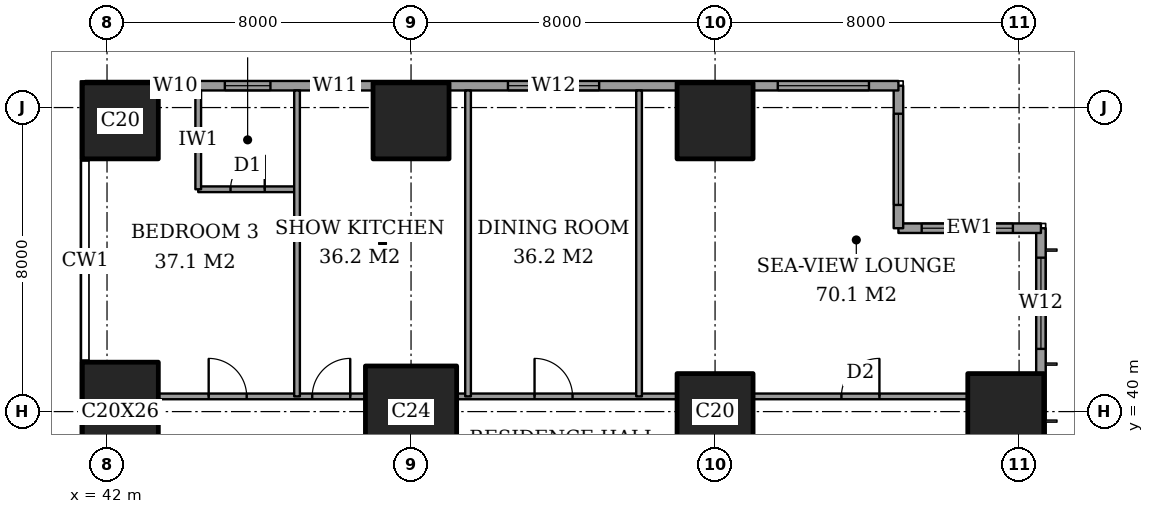
"""IFC4 building model, lengths in metres.
Left out: names, types, materials, properties, quantities, classifications, styles, units other than length and angle.
Written with IfcOpenShell. Run it as: python <this file> out.ifc"""

import sys

from ifc_helpers import new_model, si_unit, direction, frame, frame_2d, origin, origin_2d, place, context, subcontext, project, spatial, rectangle, extrude, element, fill, save


model = new_model("IFC4")
c1 = context("Model", 3, precision=1e-05, world=origin(), true_north=direction((0.0, 1.0)))
c2 = subcontext(c1, "Body", "Model", "MODEL_VIEW")
j1 = project(units=[si_unit("LENGTHUNIT", "METRE"), si_unit("PLANEANGLEUNIT", "RADIAN")], contexts=[c1])
p1 = place(None, origin())
s1 = spatial("IfcSite", under=j1, at=p1, CompositionType="ELEMENT")
p2 = place(p1, origin())
s2 = spatial("IfcBuilding", under=s1, at=p2, CompositionType="ELEMENT")
p3 = place(p2, frame((0.0, 0.0, 125.0)))
s3 = spatial("IfcBuildingStorey", under=s2, at=p3, CompositionType="ELEMENT", Elevation=125.0)
p4 = place(p3, frame((42.35, 40.0, 0.0), z_axis=(0.0, 0.0, 1.0), x_axis=(1.0, 0.0, 0.0)))
e1 = element("IfcColumn", 1, at=p4, inside=s3, PredefinedType="COLUMN", context=c2, shape_type="SweptSolid", body=[
    extrude(rectangle(XDim=2.0, YDim=2.6, at=origin_2d()), origin(), (0.0, 0.0, 1.0), 3.6),
])
p5 = place(p3, frame((42.35, 47.65, 0.0), z_axis=(0.0, 0.0, 1.0), x_axis=(1.0, 0.0, 0.0)))
e2 = element("IfcColumn", 2, at=p5, inside=s3, PredefinedType="COLUMN", context=c2, shape_type="SweptSolid", body=[
    extrude(rectangle(XDim=2.0, YDim=2.0, at=origin_2d()), origin(), (0.0, 0.0, 1.0), 3.6),
])
p6 = place(p3, frame((50.0, 40.0, 0.0), z_axis=(0.0, 0.0, 1.0), x_axis=(1.0, 0.0, 0.0)))
e3 = element("IfcColumn", 3, at=p6, inside=s3, PredefinedType="COLUMN", context=c2, shape_type="SweptSolid", body=[
    extrude(rectangle(XDim=2.4, YDim=2.4, at=origin_2d()), origin(), (0.0, 0.0, 1.0), 3.6),
])
for number, where, z_axis, x_axis in (
    (4, (50.0, 47.65, 0.0), (0.0, 0.0, 1.0), (1.0, 0.0, 0.0)),
    (5, (58.0, 40.0, 0.0), (0.0, 0.0, 1.0), (1.0, 0.0, 0.0)),
    (6, (58.0, 47.65, 0.0), (0.0, 0.0, 1.0), (1.0, 0.0, 0.0)),
    (7, (65.65, 40.0, 0.0), (0.0, 0.0, 1.0), (1.0, 0.0, 0.0)),
):
    element("IfcColumn", number, at=place(p3, frame(where, z_axis=z_axis, x_axis=x_axis)), inside=s3, PredefinedType="COLUMN", context=c2, shape_type="SweptSolid", body=[
        extrude(rectangle(XDim=2.0, YDim=2.0, at=origin_2d()), origin(), (0.0, 0.0, 1.0), 3.6),
    ])
p7 = place(p3, frame((66.575, 3.175, 0.0), z_axis=(0.0, 0.0, 1.0), x_axis=(0.0, 1.0, 0.0)))
e8 = element("IfcWall", 8, at=p7, inside=s3, PredefinedType="SOLIDWALL", context=c2, shape_type="SweptSolid", body=[
    extrude(rectangle(XDim=41.65, YDim=0.25, at=frame_2d((20.825, 0.0))), origin(), (0.0, 0.0, 1.0), 3.6),
])
p8 = place(p7, frame((0.775, 0.0, 0.4)))
e9 = element("IfcOpeningElement", 9, at=p8, cuts=e8, PredefinedType="OPENING", context=c2, shape_type="SweptSolid", body=[
    extrude(rectangle(XDim=2.4, YDim=2.2, at=frame_2d((1.2, 1.1))), frame((0.0, 0.135, 0.0), z_axis=(0.0, -1.0, 0.0), x_axis=(1.0, 0.0, 0.0)), (0.0, 0.0, 1.0), 0.27),
])
p9 = place(p7, frame((6.125, 0.0, 0.4)))
e10 = element("IfcOpeningElement", 10, at=p9, cuts=e8, PredefinedType="OPENING", context=c2, shape_type="SweptSolid", body=[
    extrude(rectangle(XDim=1.2, YDim=2.2, at=frame_2d((0.6, 1.1))), frame((0.0, 0.135, 0.0), z_axis=(0.0, -1.0, 0.0), x_axis=(1.0, 0.0, 0.0)), (0.0, 0.0, 1.0), 0.27),
])
p10 = place(p7, frame((8.375, 0.0, 0.4)))
e11 = element("IfcOpeningElement", 11, at=p10, cuts=e8, PredefinedType="OPENING", context=c2, shape_type="SweptSolid", body=[
    extrude(rectangle(XDim=2.4, YDim=2.2, at=frame_2d((1.2, 1.1))), frame((0.0, 0.135, 0.0), z_axis=(0.0, -1.0, 0.0), x_axis=(1.0, 0.0, 0.0)), (0.0, 0.0, 1.0), 0.27),
])
p11 = place(p7, frame((15.775, 0.0, 0.4)))
e12 = element("IfcOpeningElement", 12, at=p11, cuts=e8, PredefinedType="OPENING", context=c2, shape_type="SweptSolid", body=[
    extrude(rectangle(XDim=2.4, YDim=2.2, at=frame_2d((1.2, 1.1))), frame((0.0, 0.135, 0.0), z_axis=(0.0, -1.0, 0.0), x_axis=(1.0, 0.0, 0.0)), (0.0, 0.0, 1.0), 0.27),
])
p12 = place(p7, frame((23.475, 0.0, 0.4)))
e13 = element("IfcOpeningElement", 13, at=p12, cuts=e8, PredefinedType="OPENING", context=c2, shape_type="SweptSolid", body=[
    extrude(rectangle(XDim=2.4, YDim=2.2, at=frame_2d((1.2, 1.1))), frame((0.0, 0.135, 0.0), z_axis=(0.0, -1.0, 0.0), x_axis=(1.0, 0.0, 0.0)), (0.0, 0.0, 1.0), 0.27),
])
p13 = place(p7, frame((30.975, 0.0, 0.4)))
e14 = element("IfcOpeningElement", 14, at=p13, cuts=e8, PredefinedType="OPENING", context=c2, shape_type="SweptSolid", body=[
    extrude(rectangle(XDim=2.4, YDim=2.2, at=frame_2d((1.2, 1.1))), frame((0.0, 0.135, 0.0), z_axis=(0.0, -1.0, 0.0), x_axis=(1.0, 0.0, 0.0)), (0.0, 0.0, 1.0), 0.27),
])
p14 = place(p7, frame((34.5, 0.0, 0.4)))
e15 = element("IfcOpeningElement", 15, at=p14, cuts=e8, PredefinedType="OPENING", context=c2, shape_type="SweptSolid", body=[
    extrude(rectangle(XDim=1.2, YDim=2.2, at=frame_2d((0.6, 1.1))), frame((0.0, 0.135, 0.0), z_axis=(0.0, -1.0, 0.0), x_axis=(1.0, 0.0, 0.0)), (0.0, 0.0, 1.0), 0.27),
])
p15 = place(p7, frame((38.475, 0.0, 0.4)))
e16 = element("IfcOpeningElement", 16, at=p15, cuts=e8, PredefinedType="OPENING", context=c2, shape_type="SweptSolid", body=[
    extrude(rectangle(XDim=2.4, YDim=2.2, at=frame_2d((1.2, 1.1))), frame((0.0, 0.135, 0.0), z_axis=(0.0, -1.0, 0.0), x_axis=(1.0, 0.0, 0.0)), (0.0, 0.0, 1.0), 0.27),
])
p16 = place(p3, frame((66.575, 44.825, 0.0), z_axis=(0.0, 0.0, 1.0), x_axis=(-1.0, 0.0, 0.0)))
e17 = element("IfcWall", 17, at=p16, inside=s3, PredefinedType="SOLIDWALL", context=c2, shape_type="SweptSolid", body=[
    extrude(rectangle(XDim=3.75, YDim=0.25, at=frame_2d((1.875, 0.0))), origin(), (0.0, 0.0, 1.0), 3.6),
])
p17 = place(p16, frame((0.738, 0.0, 0.4)))
e18 = element("IfcOpeningElement", 18, at=p17, cuts=e17, PredefinedType="OPENING", context=c2, shape_type="SweptSolid", body=[
    extrude(rectangle(XDim=2.4, YDim=2.2, at=frame_2d((1.2, 1.1))), frame((0.0, 0.135, 0.0), z_axis=(0.0, -1.0, 0.0), x_axis=(1.0, 0.0, 0.0)), (0.0, 0.0, 1.0), 0.27),
])
p18 = place(p3, frame((62.825, 44.825, 0.0), z_axis=(0.0, 0.0, 1.0), x_axis=(0.0, 1.0, 0.0)))
e19 = element("IfcWall", 19, at=p18, inside=s3, PredefinedType="SOLIDWALL", context=c2, shape_type="SweptSolid", body=[
    extrude(rectangle(XDim=3.75, YDim=0.25, at=frame_2d((1.875, 0.0))), origin(), (0.0, 0.0, 1.0), 3.6),
])
p19 = place(p18, frame((0.613, 0.0, 0.4)))
e20 = element("IfcOpeningElement", 20, at=p19, cuts=e19, PredefinedType="OPENING", context=c2, shape_type="SweptSolid", body=[
    extrude(rectangle(XDim=2.4, YDim=2.2, at=frame_2d((1.2, 1.1))), frame((0.0, 0.135, 0.0), z_axis=(0.0, -1.0, 0.0), x_axis=(1.0, 0.0, 0.0)), (0.0, 0.0, 1.0), 0.27),
])
p20 = place(p3, frame((62.825, 48.575, 0.0), z_axis=(0.0, 0.0, 1.0), x_axis=(-1.0, 0.0, 0.0)))
e21 = element("IfcWall", 21, at=p20, inside=s3, PredefinedType="SOLIDWALL", context=c2, shape_type="SweptSolid", body=[
    extrude(rectangle(XDim=21.4, YDim=0.25, at=frame_2d((10.7, 0.0))), origin(), (0.0, 0.0, 1.0), 3.6),
])
p21 = place(p20, frame((0.775, 0.0, 0.4)))
e22 = element("IfcOpeningElement", 22, at=p21, cuts=e21, PredefinedType="OPENING", context=c2, shape_type="SweptSolid", body=[
    extrude(rectangle(XDim=2.4, YDim=2.2, at=frame_2d((1.2, 1.1))), frame((0.0, 0.135, 0.0), z_axis=(0.0, -1.0, 0.0), x_axis=(1.0, 0.0, 0.0)), (0.0, 0.0, 1.0), 0.27),
])
p22 = place(p20, frame((7.875, 0.0, 0.4)))
e23 = element("IfcOpeningElement", 23, at=p22, cuts=e21, PredefinedType="OPENING", context=c2, shape_type="SweptSolid", body=[
    extrude(rectangle(XDim=2.4, YDim=2.2, at=frame_2d((1.2, 1.1))), frame((0.0, 0.135, 0.0), z_axis=(0.0, -1.0, 0.0), x_axis=(1.0, 0.0, 0.0)), (0.0, 0.0, 1.0), 0.27),
])
p23 = place(p20, frame((14.225, 0.0, 0.4)))
e24 = element("IfcOpeningElement", 24, at=p23, cuts=e21, PredefinedType="OPENING", context=c2, shape_type="SweptSolid", body=[
    extrude(rectangle(XDim=1.2, YDim=2.2, at=frame_2d((0.6, 1.1))), frame((0.0, 0.135, 0.0), z_axis=(0.0, -1.0, 0.0), x_axis=(1.0, 0.0, 0.0)), (0.0, 0.0, 1.0), 0.27),
])
p24 = place(p20, frame((16.525, 0.0, 0.4)))
e25 = element("IfcOpeningElement", 25, at=p24, cuts=e21, PredefinedType="OPENING", context=c2, shape_type="SweptSolid", body=[
    extrude(rectangle(XDim=1.2, YDim=2.2, at=frame_2d((0.6, 1.1))), frame((0.0, 0.135, 0.0), z_axis=(0.0, -1.0, 0.0), x_axis=(1.0, 0.0, 0.0)), (0.0, 0.0, 1.0), 0.27),
])
p25 = place(p20, frame((18.725, 0.0, 0.4)))
e26 = element("IfcOpeningElement", 26, at=p25, cuts=e21, PredefinedType="OPENING", context=c2, shape_type="SweptSolid", body=[
    extrude(rectangle(XDim=0.6, YDim=2.2, at=frame_2d((0.3, 1.1))), frame((0.0, 0.135, 0.0), z_axis=(0.0, -1.0, 0.0), x_axis=(1.0, 0.0, 0.0)), (0.0, 0.0, 1.0), 0.27),
])
p26 = place(p3, frame((43.35, 40.4, 0.0), z_axis=(0.0, 0.0, 1.0), x_axis=(1.0, 0.0, 0.0)))
e27 = element("IfcWall", 27, at=p26, inside=s3, PredefinedType="PARTITIONING", context=c2, shape_type="SweptSolid", body=[
    extrude(rectangle(XDim=5.45, YDim=0.15, at=frame_2d((2.725, 0.0))), origin(), (0.0, 0.0, 1.0), 3.35),
])
p27 = place(p26, frame((4.05, 0.0, 0.0)))
e28 = element("IfcOpeningElement", 28, at=p27, cuts=e27, PredefinedType="OPENING", context=c2, shape_type="SweptSolid", body=[
    extrude(rectangle(XDim=1.0, YDim=2.1, at=frame_2d((0.5, 1.05))), frame((0.0, 0.085, 0.0), z_axis=(0.0, -1.0, 0.0), x_axis=(1.0, 0.0, 0.0)), (0.0, 0.0, 1.0), 0.17),
])
p28 = place(p26, frame((1.325, 0.0, 0.0)))
e29 = element("IfcOpeningElement", 29, at=p28, cuts=e27, PredefinedType="OPENING", context=c2, shape_type="SweptSolid", body=[
    extrude(rectangle(XDim=1.0, YDim=2.1, at=frame_2d((0.5, 1.05))), frame((0.0, 0.085, 0.0), z_axis=(0.0, -1.0, 0.0), x_axis=(1.0, 0.0, 0.0)), (0.0, 0.0, 1.0), 0.17),
])
p29 = place(p3, frame((51.2, 40.4, 0.0), z_axis=(0.0, 0.0, 1.0), x_axis=(1.0, 0.0, 0.0)))
e30 = element("IfcWall", 30, at=p29, inside=s3, PredefinedType="PARTITIONING", context=c2, shape_type="SweptSolid", body=[
    extrude(rectangle(XDim=5.8, YDim=0.15, at=frame_2d((2.9, 0.0))), origin(), (0.0, 0.0, 1.0), 3.35),
])
p30 = place(p29, frame((2.05, 0.0, 0.0)))
e31 = element("IfcOpeningElement", 31, at=p30, cuts=e30, PredefinedType="OPENING", context=c2, shape_type="SweptSolid", body=[
    extrude(rectangle(XDim=1.0, YDim=2.1, at=frame_2d((0.5, 1.05))), frame((0.0, 0.085, 0.0), z_axis=(0.0, -1.0, 0.0), x_axis=(1.0, 0.0, 0.0)), (0.0, 0.0, 1.0), 0.17),
])
p31 = place(p3, frame((59.0, 40.4, 0.0), z_axis=(0.0, 0.0, 1.0), x_axis=(1.0, 0.0, 0.0)))
e32 = element("IfcWall", 32, at=p31, inside=s3, PredefinedType="PARTITIONING", context=c2, shape_type="SweptSolid", body=[
    extrude(rectangle(XDim=5.65, YDim=0.15, at=frame_2d((2.825, 0.0))), origin(), (0.0, 0.0, 1.0), 3.35),
])
p32 = place(p31, frame((2.325, 0.0, 0.0)))
e33 = element("IfcOpeningElement", 33, at=p32, cuts=e32, PredefinedType="OPENING", context=c2, shape_type="SweptSolid", body=[
    extrude(rectangle(XDim=1.0, YDim=2.1, at=frame_2d((0.5, 1.05))), frame((0.0, 0.085, 0.0), z_axis=(0.0, -1.0, 0.0), x_axis=(1.0, 0.0, 0.0)), (0.0, 0.0, 1.0), 0.17),
])
p33 = place(p3, frame((44.4, 45.85, 0.0), z_axis=(0.0, 0.0, 1.0), x_axis=(1.0, 0.0, 0.0)))
e34 = element("IfcWall", 34, at=p33, inside=s3, PredefinedType="PARTITIONING", context=c2, shape_type="SweptSolid", body=[
    extrude(rectangle(XDim=2.6, YDim=0.15, at=frame_2d((1.3, 0.0))), origin(), (0.0, 0.0, 1.0), 3.35),
])
p34 = place(p33, frame((0.85, 0.0, 0.0)))
e35 = element("IfcOpeningElement", 35, at=p34, cuts=e34, PredefinedType="OPENING", context=c2, shape_type="SweptSolid", body=[
    extrude(rectangle(XDim=0.9, YDim=2.1, at=frame_2d((0.45, 1.05))), frame((0.0, 0.085, 0.0), z_axis=(0.0, -1.0, 0.0), x_axis=(1.0, 0.0, 0.0)), (0.0, 0.0, 1.0), 0.17),
])
p35 = place(p3, frame((44.4, 45.85, 0.0), z_axis=(0.0, 0.0, 1.0), x_axis=(0.0, 1.0, 0.0)))
e36 = element("IfcWall", 36, at=p35, inside=s3, PredefinedType="PARTITIONING", context=c2, shape_type="SweptSolid", body=[
    extrude(rectangle(XDim=2.6, YDim=0.15, at=frame_2d((1.3, 0.0))), origin(), (0.0, 0.0, 1.0), 3.35),
])
for number, where, z_axis, x_axis in (
    (37, (47.0, 40.4, 0.0), (0.0, 0.0, 1.0), (0.0, 1.0, 0.0)),
    (38, (51.5, 40.4, 0.0), (0.0, 0.0, 1.0), (0.0, 1.0, 0.0)),
    (39, (56.0, 40.4, 0.0), (0.0, 0.0, 1.0), (0.0, 1.0, 0.0)),
):
    element("IfcWall", number, at=place(p3, frame(where, z_axis=z_axis, x_axis=x_axis)), inside=s3, PredefinedType="PARTITIONING", context=c2, shape_type="SweptSolid", body=[
        extrude(rectangle(XDim=8.05, YDim=0.15, at=frame_2d((4.025, 0.0))), origin(), (0.0, 0.0, 1.0), 3.35),
    ])
p36 = place(p15, origin())
e40 = element("IfcWindow", 40, at=p36, inside=s3, PartitioningType="SINGLE_PANEL", PredefinedType="WINDOW", context=c2, shape_type="SweptSolid", body=[
    extrude(rectangle(XDim=2.4, YDim=2.2, at=frame_2d((1.2, 1.1))), frame((0.0, 0.03, 0.0), z_axis=(0.0, -1.0, 0.0), x_axis=(1.0, 0.0, 0.0)), (0.0, 0.0, 1.0), 0.06),
])
fill(e16, e40)
p37 = place(p17, origin())
e41 = element("IfcWindow", 41, at=p37, inside=s3, PartitioningType="SINGLE_PANEL", PredefinedType="WINDOW", context=c2, shape_type="SweptSolid", body=[
    extrude(rectangle(XDim=2.4, YDim=2.2, at=frame_2d((1.2, 1.1))), frame((0.0, 0.03, 0.0), z_axis=(0.0, -1.0, 0.0), x_axis=(1.0, 0.0, 0.0)), (0.0, 0.0, 1.0), 0.06),
])
fill(e18, e41)
p38 = place(p19, origin())
e42 = element("IfcWindow", 42, at=p38, inside=s3, PartitioningType="SINGLE_PANEL", PredefinedType="WINDOW", context=c2, shape_type="SweptSolid", body=[
    extrude(rectangle(XDim=2.4, YDim=2.2, at=frame_2d((1.2, 1.1))), frame((0.0, 0.03, 0.0), z_axis=(0.0, -1.0, 0.0), x_axis=(1.0, 0.0, 0.0)), (0.0, 0.0, 1.0), 0.06),
])
fill(e20, e42)
p39 = place(p21, origin())
e43 = element("IfcWindow", 43, at=p39, inside=s3, PartitioningType="SINGLE_PANEL", PredefinedType="WINDOW", context=c2, shape_type="SweptSolid", body=[
    extrude(rectangle(XDim=2.4, YDim=2.2, at=frame_2d((1.2, 1.1))), frame((0.0, 0.03, 0.0), z_axis=(0.0, -1.0, 0.0), x_axis=(1.0, 0.0, 0.0)), (0.0, 0.0, 1.0), 0.06),
])
fill(e22, e43)
p40 = place(p22, origin())
e44 = element("IfcWindow", 44, at=p40, inside=s3, PartitioningType="SINGLE_PANEL", PredefinedType="WINDOW", context=c2, shape_type="SweptSolid", body=[
    extrude(rectangle(XDim=2.4, YDim=2.2, at=frame_2d((1.2, 1.1))), frame((0.0, 0.03, 0.0), z_axis=(0.0, -1.0, 0.0), x_axis=(1.0, 0.0, 0.0)), (0.0, 0.0, 1.0), 0.06),
])
fill(e23, e44)
p41 = place(p23, origin())
e45 = element("IfcWindow", 45, at=p41, inside=s3, PartitioningType="SINGLE_PANEL", PredefinedType="WINDOW", context=c2, shape_type="SweptSolid", body=[
    extrude(rectangle(XDim=1.2, YDim=2.2, at=frame_2d((0.6, 1.1))), frame((0.0, 0.03, 0.0), z_axis=(0.0, -1.0, 0.0), x_axis=(1.0, 0.0, 0.0)), (0.0, 0.0, 1.0), 0.06),
])
fill(e24, e45)
p42 = place(p24, origin())
e46 = element("IfcWindow", 46, at=p42, inside=s3, PartitioningType="SINGLE_PANEL", PredefinedType="WINDOW", context=c2, shape_type="SweptSolid", body=[
    extrude(rectangle(XDim=1.2, YDim=2.2, at=frame_2d((0.6, 1.1))), frame((0.0, 0.03, 0.0), z_axis=(0.0, -1.0, 0.0), x_axis=(1.0, 0.0, 0.0)), (0.0, 0.0, 1.0), 0.06),
])
fill(e25, e46)
p43 = place(p25, origin())
e47 = element("IfcWindow", 47, at=p43, inside=s3, PartitioningType="SINGLE_PANEL", PredefinedType="WINDOW", context=c2, shape_type="SweptSolid", body=[
    extrude(rectangle(XDim=0.6, YDim=2.2, at=frame_2d((0.3, 1.1))), frame((0.0, 0.03, 0.0), z_axis=(0.0, -1.0, 0.0), x_axis=(1.0, 0.0, 0.0)), (0.0, 0.0, 1.0), 0.06),
])
fill(e26, e47)
p44 = place(p32, origin())
e48 = element("IfcDoor", 48, at=p44, inside=s3, OperationType="SINGLE_SWING_LEFT", PredefinedType="DOOR", context=c2, shape_type="SweptSolid", body=[
    extrude(rectangle(XDim=1.0, YDim=2.1, at=frame_2d((0.5, 1.05))), frame((0.0, 0.025, 0.0), z_axis=(0.0, -1.0, 0.0), x_axis=(1.0, 0.0, 0.0)), (0.0, 0.0, 1.0), 0.05),
])
fill(e33, e48)
p45 = place(p30, origin())
e49 = element("IfcDoor", 49, at=p45, inside=s3, OperationType="SINGLE_SWING_RIGHT", PredefinedType="DOOR", context=c2, shape_type="SweptSolid", body=[
    extrude(rectangle(XDim=1.0, YDim=2.1, at=frame_2d((0.5, 1.05))), frame((0.0, 0.025, 0.0), z_axis=(0.0, -1.0, 0.0), x_axis=(1.0, 0.0, 0.0)), (0.0, 0.0, 1.0), 0.05),
])
fill(e31, e49)
p46 = place(p27, origin())
e50 = element("IfcDoor", 50, at=p46, inside=s3, OperationType="SINGLE_SWING_LEFT", PredefinedType="DOOR", context=c2, shape_type="SweptSolid", body=[
    extrude(rectangle(XDim=1.0, YDim=2.1, at=frame_2d((0.5, 1.05))), frame((0.0, 0.025, 0.0), z_axis=(0.0, -1.0, 0.0), x_axis=(1.0, 0.0, 0.0)), (0.0, 0.0, 1.0), 0.05),
])
fill(e28, e50)
p47 = place(p34, origin())
e51 = element("IfcDoor", 51, at=p47, inside=s3, OperationType="SINGLE_SWING_LEFT", PredefinedType="DOOR", context=c2, shape_type="SweptSolid", body=[
    extrude(rectangle(XDim=0.9, YDim=2.1, at=frame_2d((0.45, 1.05))), frame((0.0, 0.025, 0.0), z_axis=(0.0, -1.0, 0.0), x_axis=(1.0, 0.0, 0.0)), (0.0, 0.0, 1.0), 0.05),
])
fill(e35, e51)
p48 = place(p28, origin())
e52 = element("IfcDoor", 52, at=p48, inside=s3, OperationType="SINGLE_SWING_RIGHT", PredefinedType="DOOR", context=c2, shape_type="SweptSolid", body=[
    extrude(rectangle(XDim=1.0, YDim=2.1, at=frame_2d((0.5, 1.05))), frame((0.0, 0.025, 0.0), z_axis=(0.0, -1.0, 0.0), x_axis=(1.0, 0.0, 0.0)), (0.0, 0.0, 1.0), 0.05),
])
fill(e29, e52)
save(model, sys.argv[1])
